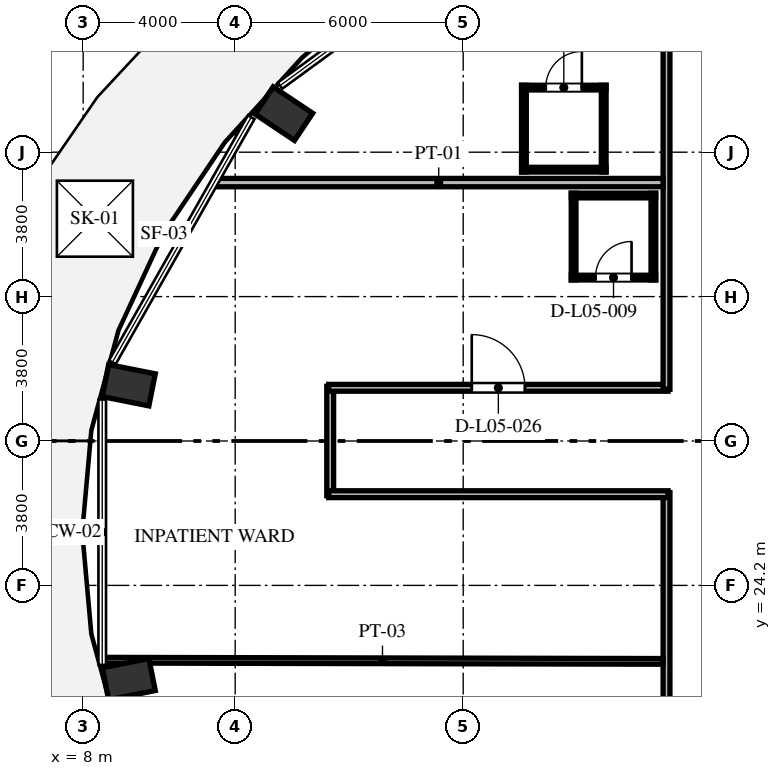
"""IFC4 building model, lengths in metres.
Left out: names, types, materials, properties, quantities, classifications, styles, units other than length and angle.
Written with IfcOpenShell. Run it as: python <this file> out.ifc"""

import sys

from ifc_helpers import new_model, si_unit, direction, frame, frame_2d, origin, origin_2d, place, context, subcontext, project, spatial, rectangle, extrude, element, fill, save


model = new_model("IFC4")
c1 = context("Model", 3, precision=1e-05, world=origin(), true_north=direction((0.0, 1.0)))
c2 = subcontext(c1, "Body", "Model", "MODEL_VIEW")
j1 = project(units=[si_unit("LENGTHUNIT", "METRE"), si_unit("PLANEANGLEUNIT", "RADIAN")], contexts=[c1])
p1 = place(None, origin())
s1 = spatial("IfcSite", under=j1, at=p1, CompositionType="ELEMENT")
p2 = place(p1, origin())
s2 = spatial("IfcBuilding", under=s1, at=p2, CompositionType="ELEMENT")
p3 = place(p2, frame((0.0, 0.0, 25.2)))
s3 = spatial("IfcBuildingStorey", under=s2, at=p3, CompositionType="ELEMENT", Elevation=25.2)
for number, where, z_axis, x_axis in (
    (1, (13.28, 36.614, 0.0), (0.0, 0.0, 1.0), (-0.831, 0.556, 0.0)),
    (2, (9.2, 29.468, 0.0), (0.0, 0.0, 1.0), (-0.981, 0.195, 0.0)),
    (3, (9.2, 21.732, 0.0), (0.0, 0.0, 1.0), (-0.981, -0.195, 0.0)),
):
    element("IfcColumn", number, at=place(p3, frame(where, z_axis=z_axis, x_axis=x_axis)), inside=s3, PredefinedType="COLUMN", context=c2, shape_type="SweptSolid", body=[
        extrude(rectangle(XDim=1.25, YDim=0.86, at=origin_2d()), origin(), (0.0, 0.0, 1.0), 3.648),
    ])
p4 = place(p3, frame((14.5, 26.56, 0.0), z_axis=(0.0, 0.0, 1.0), x_axis=(0.0, 1.0, 0.0)))
e4 = element("IfcWall", 4, at=p4, inside=s3, PredefinedType="PARTITIONING", context=c2, shape_type="SweptSolid", body=[
    extrude(rectangle(XDim=2.88, YDim=0.18, at=frame_2d((1.44, 0.0))), origin(), (0.0, 0.0, 1.0), 3.428),
])
p5 = place(p3, frame((14.46, 29.4, 0.0), z_axis=(0.0, 0.0, 1.0), x_axis=(1.0, 0.0, 0.0)))
e5 = element("IfcWall", 5, at=p5, inside=s3, PredefinedType="PARTITIONING", context=c2, shape_type="SweptSolid", body=[
    extrude(rectangle(XDim=8.93, YDim=0.18, at=frame_2d((4.465, 0.0))), origin(), (0.0, 0.0, 1.0), 3.428),
])
p6 = place(p5, frame((3.765, 0.0, 0.0)))
e6 = element("IfcOpeningElement", 6, at=p6, cuts=e5, PredefinedType="OPENING", context=c2, shape_type="SweptSolid", body=[
    extrude(rectangle(XDim=1.4, YDim=2.2, at=frame_2d((0.7, 1.1))), frame((0.0, 0.1, 0.0), z_axis=(0.0, -1.0, 0.0), x_axis=(1.0, 0.0, 0.0)), (0.0, 0.0, 1.0), 0.2),
])
p7 = place(p3, frame((23.35, 29.36, 0.0), z_axis=(0.0, 0.0, 1.0), x_axis=(0.0, 1.0, 0.0)))
e7 = element("IfcWall", 7, at=p7, inside=s3, PredefinedType="PARTITIONING", context=c2, shape_type="SweptSolid", body=[
    extrude(rectangle(XDim=9.43, YDim=0.18, at=frame_2d((4.715, 0.0))), origin(), (0.0, 0.0, 1.0), 3.428),
])
p8 = place(p3, frame((23.35, 17.36, 0.0), z_axis=(0.0, 0.0, 1.0), x_axis=(0.0, 1.0, 0.0)))
e8 = element("IfcWall", 8, at=p8, inside=s3, PredefinedType="PARTITIONING", context=c2, shape_type="SweptSolid", body=[
    extrude(rectangle(XDim=9.28, YDim=0.18, at=frame_2d((4.64, 0.0))), origin(), (0.0, 0.0, 1.0), 3.428),
])
p9 = place(p3, frame((23.39, 26.6, 0.0), z_axis=(0.0, 0.0, 1.0), x_axis=(-1.0, 0.0, 0.0)))
e9 = element("IfcWall", 9, at=p9, inside=s3, PredefinedType="PARTITIONING", context=c2, shape_type="SweptSolid", body=[
    extrude(rectangle(XDim=8.93, YDim=0.18, at=frame_2d((4.465, 0.0))), origin(), (0.0, 0.0, 1.0), 3.428),
])
p10 = place(p3, frame((8.493, 22.231, 0.0), z_axis=(0.0, 0.0, 1.0), x_axis=(0.999997760873, -0.002116187438, 0.0)))
e10 = element("IfcWall", 10, at=p10, inside=s3, PredefinedType="PARTITIONING", context=c2, shape_type="SweptSolid", body=[
    extrude(rectangle(XDim=14.767, YDim=0.15, at=frame_2d((7.384, 0.0))), origin(), (0.0, 0.0, 1.0), 3.428),
])
p11 = place(p3, frame((11.451, 34.8, 0.0), z_axis=(0.0, 0.0, 1.0), x_axis=(1.0, 0.0, 0.0)))
e11 = element("IfcWall", 11, at=p11, inside=s3, PredefinedType="PARTITIONING", context=c2, shape_type="SweptSolid", body=[
    extrude(rectangle(XDim=11.809, YDim=0.22, at=frame_2d((5.905, 0.0))), origin(), (0.0, 0.0, 1.0), 3.428),
])
p12 = place(p3, frame((19.538, 37.3, 0.0), z_axis=(0.0, 0.0, 1.0), x_axis=(1.0, 0.0, 0.0)))
e12 = element("IfcWall", 12, at=p12, inside=s3, PredefinedType="PARTITIONING", context=c2, shape_type="SweptSolid", body=[
    extrude(rectangle(XDim=2.22, YDim=0.125, at=frame_2d((1.11, 0.0))), origin(), (0.0, 0.0, 1.0), 3.428),
])
p13 = place(p12, frame((0.635, 0.0, 0.0)))
e13 = element("IfcOpeningElement", 13, at=p13, cuts=e12, PredefinedType="OPENING", context=c2, shape_type="SweptSolid", body=[
    extrude(rectangle(XDim=0.95, YDim=2.1, at=frame_2d((0.475, 1.05))), frame((0.0, 0.073, 0.0), z_axis=(0.0, -1.0, 0.0), x_axis=(1.0, 0.0, 0.0)), (0.0, 0.0, 1.0), 0.145),
])
p14 = place(p3, frame((19.538, 35.14, 0.0), z_axis=(0.0, 0.0, 1.0), x_axis=(1.0, 0.0, 0.0)))
e14 = element("IfcWall", 14, at=p14, inside=s3, PredefinedType="PARTITIONING", context=c2, shape_type="SweptSolid", body=[
    extrude(rectangle(XDim=2.22, YDim=0.125, at=frame_2d((1.11, 0.0))), origin(), (0.0, 0.0, 1.0), 3.428),
])
for number, where, z_axis, x_axis in (
    (15, (21.698, 35.08, 0.0), (0.0, 0.0, 1.0), (0.0, 1.0, 0.0)),
    (16, (19.597, 35.08, 0.0), (0.0, 0.0, 1.0), (0.0, 1.0, 0.0)),
):
    element("IfcWall", number, at=place(p3, frame(where, z_axis=z_axis, x_axis=x_axis)), inside=s3, PredefinedType="PARTITIONING", context=c2, shape_type="SweptSolid", body=[
        extrude(rectangle(XDim=2.28, YDim=0.125, at=frame_2d((1.14, 0.0))), origin(), (0.0, 0.0, 1.0), 3.428),
    ])
p15 = place(p3, frame((20.845, 34.46, 0.0), z_axis=(0.0, 0.0, 1.0), x_axis=(1.0, 0.0, 0.0)))
e17 = element("IfcWall", 17, at=p15, inside=s3, PredefinedType="PARTITIONING", context=c2, shape_type="SweptSolid", body=[
    extrude(rectangle(XDim=2.22, YDim=0.125, at=frame_2d((1.11, 0.0))), origin(), (0.0, 0.0, 1.0), 3.428),
])
p16 = place(p3, frame((20.845, 32.3, 0.0), z_axis=(0.0, 0.0, 1.0), x_axis=(1.0, 0.0, 0.0)))
e18 = element("IfcWall", 18, at=p16, inside=s3, PredefinedType="PARTITIONING", context=c2, shape_type="SweptSolid", body=[
    extrude(rectangle(XDim=2.22, YDim=0.125, at=frame_2d((1.11, 0.0))), origin(), (0.0, 0.0, 1.0), 3.428),
])
p17 = place(p16, frame((0.635, 0.0, 0.0)))
e19 = element("IfcOpeningElement", 19, at=p17, cuts=e18, PredefinedType="OPENING", context=c2, shape_type="SweptSolid", body=[
    extrude(rectangle(XDim=0.95, YDim=2.1, at=frame_2d((0.475, 1.05))), frame((0.0, 0.073, 0.0), z_axis=(0.0, -1.0, 0.0), x_axis=(1.0, 0.0, 0.0)), (0.0, 0.0, 1.0), 0.145),
])
for number, where, z_axis, x_axis in (
    (20, (23.005, 32.24, 0.0), (0.0, 0.0, 1.0), (0.0, 1.0, 0.0)),
    (21, (20.905, 32.24, 0.0), (0.0, 0.0, 1.0), (0.0, 1.0, 0.0)),
):
    element("IfcWall", number, at=place(p3, frame(where, z_axis=z_axis, x_axis=x_axis)), inside=s3, PredefinedType="PARTITIONING", context=c2, shape_type="SweptSolid", body=[
        extrude(rectangle(XDim=2.28, YDim=0.125, at=frame_2d((1.14, 0.0))), origin(), (0.0, 0.0, 1.0), 3.428),
    ])
p18 = place(p3, frame((0.0, 0.0, -0.22)))
p19 = place(p18, frame((8.309, 33.85, 0.0)))
p20 = place(p19, frame((0.0, 0.0, 0.22)))
e22 = element("IfcWindow", 22, at=p20, inside=s3, PartitioningType="SINGLE_PANEL", PredefinedType="SKYLIGHT", context=c2, shape_type="SweptSolid", body=[
    extrude(rectangle(XDim=2.0, YDim=2.0, at=origin_2d()), origin(), (0.0, 0.0, 1.0), 0.05),
])
p21 = place(p13, origin())
e23 = element("IfcDoor", 23, at=p21, inside=s3, OperationType="SINGLE_SWING_RIGHT", PredefinedType="DOOR", context=c2, shape_type="SweptSolid", body=[
    extrude(rectangle(XDim=0.95, YDim=2.1, at=frame_2d((0.475, 1.05))), frame((0.0, 0.025, 0.0), z_axis=(0.0, -1.0, 0.0), x_axis=(1.0, 0.0, 0.0)), (0.0, 0.0, 1.0), 0.05),
])
fill(e13, e23)
p22 = place(p17, origin())
e24 = element("IfcDoor", 24, at=p22, inside=s3, OperationType="SINGLE_SWING_RIGHT", PredefinedType="DOOR", context=c2, shape_type="SweptSolid", body=[
    extrude(rectangle(XDim=0.95, YDim=2.1, at=frame_2d((0.475, 1.05))), frame((0.0, 0.025, 0.0), z_axis=(0.0, -1.0, 0.0), x_axis=(1.0, 0.0, 0.0)), (0.0, 0.0, 1.0), 0.05),
])
fill(e19, e24)
p23 = place(p6, origin())
e25 = element("IfcDoor", 25, at=p23, inside=s3, OperationType="SINGLE_SWING_LEFT", PredefinedType="DOOR", context=c2, shape_type="SweptSolid", body=[
    extrude(rectangle(XDim=1.4, YDim=2.2, at=frame_2d((0.7, 1.1))), frame((0.0, 0.025, 0.0), z_axis=(0.0, -1.0, 0.0), x_axis=(1.0, 0.0, 0.0)), (0.0, 0.0, 1.0), 0.05),
])
fill(e6, e25)
save(model, sys.argv[1])
